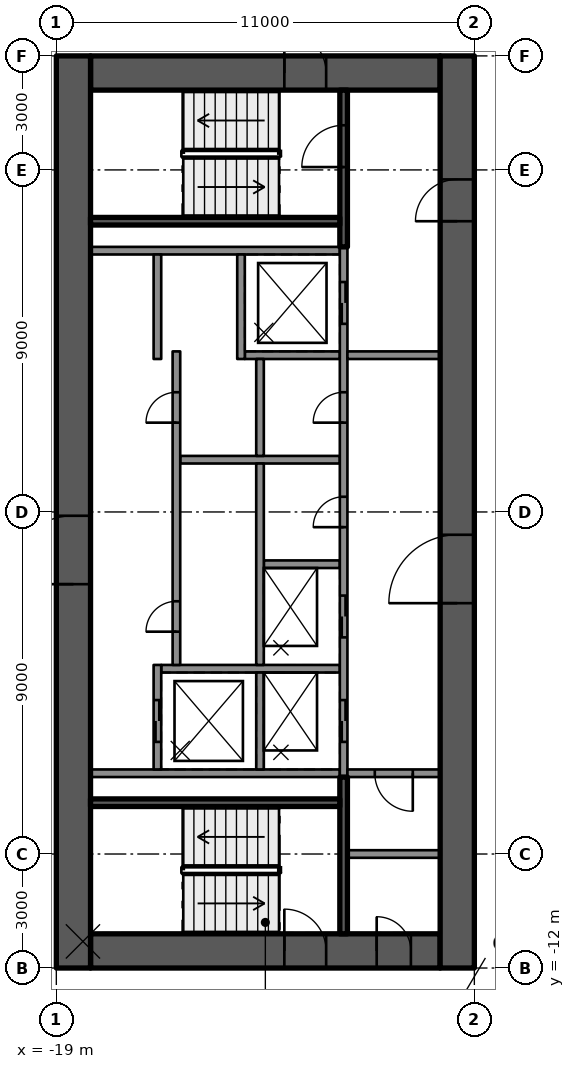
"""IFC4 building model, lengths in metres.
Left out: names, types, materials, properties, quantities, classifications, styles, units other than length and angle.
Written with IfcOpenShell. Run it as: python <this file> out.ifc"""

import sys

from ifc_helpers import new_model, si_unit, direction, frame, frame_2d, origin, place, context, subcontext, project, spatial, rectangle, extrude, element, fill, save


model = new_model("IFC4")
c1 = context("Model", 3, precision=1e-05, world=origin(), true_north=direction((0.0, 1.0)))
c2 = subcontext(c1, "Body", "Model", "MODEL_VIEW")
j1 = project(units=[si_unit("LENGTHUNIT", "METRE"), si_unit("PLANEANGLEUNIT", "RADIAN")], contexts=[c1])
p1 = place(None, origin())
s1 = spatial("IfcSite", under=j1, at=p1, CompositionType="ELEMENT")
p2 = place(p1, origin())
s2 = spatial("IfcBuilding", under=s1, at=p2, CompositionType="ELEMENT")
p3 = place(p2, frame((0.0, 0.0, 296.4)))
s3 = spatial("IfcBuildingStorey", under=s2, at=p3, CompositionType="ELEMENT", Elevation=296.4)
p4 = place(p3, frame((-18.1, 11.55, 0.0), z_axis=(0.0, 0.0, 1.0), x_axis=(1.0, 0.0, 0.0)))
e1 = element("IfcWall", 1, at=p4, inside=s3, PredefinedType="SHEAR", context=c2, shape_type="SweptSolid", body=[
    extrude(rectangle(XDim=9.2, YDim=0.9, at=frame_2d((4.6, 0.0))), origin(), (0.0, 0.0, 1.0), 3.5),
])
p5 = place(p4, frame((5.1, 0.0, 0.0)))
e2 = element("IfcOpeningElement", 2, at=p5, cuts=e1, PredefinedType="OPENING", context=c2, shape_type="SweptSolid", body=[
    extrude(rectangle(XDim=1.1, YDim=2.1, at=frame_2d((0.55, 1.05))), frame((0.0, 0.46, 0.0), z_axis=(0.0, -1.0, 0.0), x_axis=(1.0, 0.0, 0.0)), (0.0, 0.0, 1.0), 0.92),
])
p6 = place(p3, frame((-18.1, -11.55, 0.0), z_axis=(0.0, 0.0, 1.0), x_axis=(1.0, 0.0, 0.0)))
e3 = element("IfcWall", 3, at=p6, inside=s3, PredefinedType="SHEAR", context=c2, shape_type="SweptSolid", body=[
    extrude(rectangle(XDim=9.2, YDim=0.9, at=frame_2d((4.6, 0.0))), origin(), (0.0, 0.0, 1.0), 3.5),
])
p7 = place(p6, frame((5.1, 0.0, 0.0)))
e4 = element("IfcOpeningElement", 4, at=p7, cuts=e3, PredefinedType="OPENING", context=c2, shape_type="SweptSolid", body=[
    extrude(rectangle(XDim=1.1, YDim=2.1, at=frame_2d((0.55, 1.05))), frame((0.0, 0.46, 0.0), z_axis=(0.0, -1.0, 0.0), x_axis=(1.0, 0.0, 0.0)), (0.0, 0.0, 1.0), 0.92),
])
p8 = place(p6, frame((7.53, 0.0, 0.0)))
e5 = element("IfcOpeningElement", 5, at=p8, cuts=e3, PredefinedType="OPENING", context=c2, shape_type="SweptSolid", body=[
    extrude(rectangle(XDim=0.9, YDim=2.1, at=frame_2d((0.45, 1.05))), frame((0.0, 0.46, 0.0), z_axis=(0.0, -1.0, 0.0), x_axis=(1.0, 0.0, 0.0)), (0.0, 0.0, 1.0), 0.92),
])
p9 = place(p3, frame((-18.55, -12.0, 0.0), z_axis=(0.0, 0.0, 1.0), x_axis=(0.0, 1.0, 0.0)))
e6 = element("IfcWall", 6, at=p9, inside=s3, PredefinedType="SHEAR", context=c2, shape_type="SweptSolid", body=[
    extrude(rectangle(XDim=24.0, YDim=0.9, at=frame_2d((12.0, 0.0))), origin(), (0.0, 0.0, 1.0), 3.5),
])
p10 = place(p9, frame((10.1, 0.0, 0.0)))
e7 = element("IfcOpeningElement", 7, at=p10, cuts=e6, PredefinedType="OPENING", context=c2, shape_type="SweptSolid", body=[
    extrude(rectangle(XDim=1.8, YDim=2.1, at=frame_2d((0.9, 1.05))), frame((0.0, 0.46, 0.0), z_axis=(0.0, -1.0, 0.0), x_axis=(1.0, 0.0, 0.0)), (0.0, 0.0, 1.0), 0.92),
])
p11 = place(p3, frame((-8.45, -12.0, 0.0), z_axis=(0.0, 0.0, 1.0), x_axis=(0.0, 1.0, 0.0)))
e8 = element("IfcWall", 8, at=p11, inside=s3, PredefinedType="SHEAR", context=c2, shape_type="SweptSolid", body=[
    extrude(rectangle(XDim=24.0, YDim=0.9, at=frame_2d((12.0, 0.0))), origin(), (0.0, 0.0, 1.0), 3.5),
])
p12 = place(p11, frame((9.6, 0.0, 0.0)))
e9 = element("IfcOpeningElement", 9, at=p12, cuts=e8, PredefinedType="OPENING", context=c2, shape_type="SweptSolid", body=[
    extrude(rectangle(XDim=1.8, YDim=2.1, at=frame_2d((0.9, 1.05))), frame((0.0, 0.46, 0.0), z_axis=(0.0, -1.0, 0.0), x_axis=(1.0, 0.0, 0.0)), (0.0, 0.0, 1.0), 0.92),
])
p13 = place(p11, frame((19.65, 0.0, 0.0)))
e10 = element("IfcOpeningElement", 10, at=p13, cuts=e8, PredefinedType="OPENING", context=c2, shape_type="SweptSolid", body=[
    extrude(rectangle(XDim=1.1, YDim=2.1, at=frame_2d((0.55, 1.05))), frame((0.0, 0.46, 0.0), z_axis=(0.0, -1.0, 0.0), x_axis=(1.0, 0.0, 0.0)), (0.0, 0.0, 1.0), 0.92),
])
for number, where, z_axis, x_axis in (
    (11, (-11.54, 6.875, 0.0), (0.0, 0.0, 1.0), (-1.0, 0.0, 0.0)),
    (12, (-11.54, -6.875, 0.0), (0.0, 0.0, 1.0), (-1.0, 0.0, 0.0)),
):
    element("IfcWall", number, at=place(p3, frame(where, z_axis=z_axis, x_axis=x_axis)), inside=s3, PredefinedType="SOLIDWALL", context=c2, shape_type="SweptSolid", body=[
        extrude(rectangle(XDim=6.56, YDim=0.2, at=frame_2d((3.28, 0.0))), origin(), (0.0, 0.0, 1.0), 3.05),
    ])
p14 = place(p3, frame((-11.54, -4.125, 0.0), z_axis=(0.0, 0.0, 1.0), x_axis=(-1.0, 0.0, 0.0)))
e13 = element("IfcWall", 13, at=p14, inside=s3, PredefinedType="SOLIDWALL", context=c2, shape_type="SweptSolid", body=[
    extrude(rectangle(XDim=4.7, YDim=0.2, at=frame_2d((2.35, 0.0))), origin(), (0.0, 0.0, 1.0), 3.05),
])
p15 = place(p3, frame((-11.54, -1.375, 0.0), z_axis=(0.0, 0.0, 1.0), x_axis=(-1.0, 0.0, 0.0)))
e14 = element("IfcWall", 14, at=p15, inside=s3, PredefinedType="SOLIDWALL", context=c2, shape_type="SweptSolid", body=[
    extrude(rectangle(XDim=2.0, YDim=0.2, at=frame_2d((1.0, 0.0))), origin(), (0.0, 0.0, 1.0), 3.05),
])
p16 = place(p3, frame((-11.54, 1.375, 0.0), z_axis=(0.0, 0.0, 1.0), x_axis=(-1.0, 0.0, 0.0)))
e15 = element("IfcWall", 15, at=p16, inside=s3, PredefinedType="SOLIDWALL", context=c2, shape_type="SweptSolid", body=[
    extrude(rectangle(XDim=4.2, YDim=0.2, at=frame_2d((2.1, 0.0))), origin(), (0.0, 0.0, 1.0), 3.05),
])
p17 = place(p3, frame((-11.54, 4.125, 0.0), z_axis=(0.0, 0.0, 1.0), x_axis=(-1.0, 0.0, 0.0)))
e16 = element("IfcWall", 16, at=p17, inside=s3, PredefinedType="SOLIDWALL", context=c2, shape_type="SweptSolid", body=[
    extrude(rectangle(XDim=2.5, YDim=0.2, at=frame_2d((1.25, 0.0))), origin(), (0.0, 0.0, 1.0), 3.05),
])
p18 = place(p3, frame((-11.44, -6.975, 0.0), z_axis=(0.0, 0.0, 1.0), x_axis=(0.0, 1.0, 0.0)))
e17 = element("IfcWall", 17, at=p18, inside=s3, PredefinedType="SOLIDWALL", context=c2, shape_type="SweptSolid", body=[
    extrude(rectangle(XDim=13.95, YDim=0.2, at=frame_2d((6.975, 0.0))), origin(), (0.0, 0.0, 1.0), 3.05),
])
p19 = place(p18, frame((0.925, 0.0, 0.0)))
e18 = element("IfcOpeningElement", 18, at=p19, cuts=e17, PredefinedType="OPENING", context=c2, shape_type="SweptSolid", body=[
    extrude(rectangle(XDim=1.1, YDim=2.1, at=frame_2d((0.55, 1.05))), frame((0.0, 0.11, 0.0), z_axis=(0.0, -1.0, 0.0), x_axis=(1.0, 0.0, 0.0)), (0.0, 0.0, 1.0), 0.22),
])
p20 = place(p18, frame((3.675, 0.0, 0.0)))
e19 = element("IfcOpeningElement", 19, at=p20, cuts=e17, PredefinedType="OPENING", context=c2, shape_type="SweptSolid", body=[
    extrude(rectangle(XDim=1.1, YDim=2.1, at=frame_2d((0.55, 1.05))), frame((0.0, 0.11, 0.0), z_axis=(0.0, -1.0, 0.0), x_axis=(1.0, 0.0, 0.0)), (0.0, 0.0, 1.0), 0.22),
])
p21 = place(p18, frame((11.925, 0.0, 0.0)))
e20 = element("IfcOpeningElement", 20, at=p21, cuts=e17, PredefinedType="OPENING", context=c2, shape_type="SweptSolid", body=[
    extrude(rectangle(XDim=1.1, YDim=2.1, at=frame_2d((0.55, 1.05))), frame((0.0, 0.11, 0.0), z_axis=(0.0, -1.0, 0.0), x_axis=(1.0, 0.0, 0.0)), (0.0, 0.0, 1.0), 0.22),
])
p22 = place(p18, frame((6.575, 0.0, 0.0)))
e21 = element("IfcOpeningElement", 21, at=p22, cuts=e17, PredefinedType="OPENING", context=c2, shape_type="SweptSolid", body=[
    extrude(rectangle(XDim=0.8, YDim=2.1, at=frame_2d((0.4, 1.05))), frame((0.0, 0.11, 0.0), z_axis=(0.0, -1.0, 0.0), x_axis=(1.0, 0.0, 0.0)), (0.0, 0.0, 1.0), 0.22),
])
p23 = place(p18, frame((9.325, 0.0, 0.0)))
e22 = element("IfcOpeningElement", 22, at=p23, cuts=e17, PredefinedType="OPENING", context=c2, shape_type="SweptSolid", body=[
    extrude(rectangle(XDim=0.8, YDim=2.1, at=frame_2d((0.4, 1.05))), frame((0.0, 0.11, 0.0), z_axis=(0.0, -1.0, 0.0), x_axis=(1.0, 0.0, 0.0)), (0.0, 0.0, 1.0), 0.22),
])
p24 = place(p3, frame((-13.64, -6.775, 0.0), z_axis=(0.0, 0.0, 1.0), x_axis=(0.0, 1.0, 0.0)))
e23 = element("IfcWall", 23, at=p24, inside=s3, PredefinedType="SOLIDWALL", context=c2, shape_type="SweptSolid", body=[
    extrude(rectangle(XDim=2.55, YDim=0.2, at=frame_2d((1.275, 0.0))), origin(), (0.0, 0.0, 1.0), 3.05),
])
p25 = place(p3, frame((-13.64, -4.025, 0.0), z_axis=(0.0, 0.0, 1.0), x_axis=(0.0, 1.0, 0.0)))
e24 = element("IfcWall", 24, at=p25, inside=s3, PredefinedType="SOLIDWALL", context=c2, shape_type="SweptSolid", body=[
    extrude(rectangle(XDim=5.3, YDim=0.2, at=frame_2d((2.65, 0.0))), origin(), (0.0, 0.0, 1.0), 3.05),
])
p26 = place(p3, frame((-13.64, 1.475, 0.0), z_axis=(0.0, 0.0, 1.0), x_axis=(0.0, 1.0, 0.0)))
e25 = element("IfcWall", 25, at=p26, inside=s3, PredefinedType="SOLIDWALL", context=c2, shape_type="SweptSolid", body=[
    extrude(rectangle(XDim=2.55, YDim=0.2, at=frame_2d((1.275, 0.0))), origin(), (0.0, 0.0, 1.0), 3.05),
])
p27 = place(p3, frame((-14.14, 4.025, 0.0), z_axis=(0.0, 0.0, 1.0), x_axis=(0.0, 1.0, 0.0)))
e26 = element("IfcWall", 26, at=p27, inside=s3, PredefinedType="SOLIDWALL", context=c2, shape_type="SweptSolid", body=[
    extrude(rectangle(XDim=2.75, YDim=0.2, at=frame_2d((1.375, 0.0))), origin(), (0.0, 0.0, 1.0), 3.05),
])
p28 = place(p3, frame((-16.34, -6.775, 0.0), z_axis=(0.0, 0.0, 1.0), x_axis=(0.0, 1.0, 0.0)))
e27 = element("IfcWall", 27, at=p28, inside=s3, PredefinedType="SOLIDWALL", context=c2, shape_type="SweptSolid", body=[
    extrude(rectangle(XDim=2.75, YDim=0.2, at=frame_2d((1.375, 0.0))), origin(), (0.0, 0.0, 1.0), 3.05),
])
p29 = place(p28, frame((0.725, 0.0, 0.0)))
e28 = element("IfcOpeningElement", 28, at=p29, cuts=e27, PredefinedType="OPENING", context=c2, shape_type="SweptSolid", body=[
    extrude(rectangle(XDim=1.1, YDim=2.1, at=frame_2d((0.55, 1.05))), frame((0.0, 0.11, 0.0), z_axis=(0.0, -1.0, 0.0), x_axis=(1.0, 0.0, 0.0)), (0.0, 0.0, 1.0), 0.22),
])
p30 = place(p3, frame((-15.84, -4.025, 0.0), z_axis=(0.0, 0.0, 1.0), x_axis=(0.0, 1.0, 0.0)))
e29 = element("IfcWall", 29, at=p30, inside=s3, PredefinedType="SOLIDWALL", context=c2, shape_type="SweptSolid", body=[
    extrude(rectangle(XDim=8.25, YDim=0.2, at=frame_2d((4.125, 0.0))), origin(), (0.0, 0.0, 1.0), 3.05),
])
p31 = place(p30, frame((0.875, 0.0, 0.0)))
e30 = element("IfcOpeningElement", 30, at=p31, cuts=e29, PredefinedType="OPENING", context=c2, shape_type="SweptSolid", body=[
    extrude(rectangle(XDim=0.8, YDim=2.1, at=frame_2d((0.4, 1.05))), frame((0.0, 0.11, 0.0), z_axis=(0.0, -1.0, 0.0), x_axis=(1.0, 0.0, 0.0)), (0.0, 0.0, 1.0), 0.22),
])
p32 = place(p30, frame((6.375, 0.0, 0.0)))
e31 = element("IfcOpeningElement", 31, at=p32, cuts=e29, PredefinedType="OPENING", context=c2, shape_type="SweptSolid", body=[
    extrude(rectangle(XDim=0.8, YDim=2.1, at=frame_2d((0.4, 1.05))), frame((0.0, 0.11, 0.0), z_axis=(0.0, -1.0, 0.0), x_axis=(1.0, 0.0, 0.0)), (0.0, 0.0, 1.0), 0.22),
])
p33 = place(p3, frame((-16.34, 4.025, 0.0), z_axis=(0.0, 0.0, 1.0), x_axis=(0.0, 1.0, 0.0)))
e32 = element("IfcWall", 32, at=p33, inside=s3, PredefinedType="SOLIDWALL", context=c2, shape_type="SweptSolid", body=[
    extrude(rectangle(XDim=2.75, YDim=0.2, at=frame_2d((1.375, 0.0))), origin(), (0.0, 0.0, 1.0), 3.05),
])
p34 = place(p3, frame((-11.44, 6.975, 0.0), z_axis=(0.0, 0.0, 1.0), x_axis=(0.0, 1.0, 0.0)))
e33 = element("IfcWall", 33, at=p34, inside=s3, PredefinedType="SOLIDWALL", context=c2, shape_type="SweptSolid", body=[
    extrude(rectangle(XDim=4.125, YDim=0.2, at=frame_2d((2.062, 0.0))), origin(), (0.0, 0.0, 1.0), 3.05),
])
p35 = place(p34, frame((2.1, 0.0, 0.0)))
e34 = element("IfcOpeningElement", 34, at=p35, cuts=e33, PredefinedType="OPENING", context=c2, shape_type="SweptSolid", body=[
    extrude(rectangle(XDim=1.1, YDim=2.1, at=frame_2d((0.55, 1.05))), frame((0.0, 0.11, 0.0), z_axis=(0.0, -1.0, 0.0), x_axis=(1.0, 0.0, 0.0)), (0.0, 0.0, 1.0), 0.22),
])
p36 = place(p3, frame((-11.54, 7.65, 0.0), z_axis=(0.0, 0.0, 1.0), x_axis=(-1.0, 0.0, 0.0)))
e35 = element("IfcWall", 35, at=p36, inside=s3, PredefinedType="SOLIDWALL", context=c2, shape_type="SweptSolid", body=[
    extrude(rectangle(XDim=6.56, YDim=0.2, at=frame_2d((3.28, 0.0))), origin(), (0.0, 0.0, 1.0), 3.05),
])
p37 = place(p3, frame((-11.44, -11.1, 0.0), z_axis=(0.0, 0.0, 1.0), x_axis=(0.0, 1.0, 0.0)))
e36 = element("IfcWall", 36, at=p37, inside=s3, PredefinedType="SOLIDWALL", context=c2, shape_type="SweptSolid", body=[
    extrude(rectangle(XDim=4.125, YDim=0.2, at=frame_2d((2.062, 0.0))), origin(), (0.0, 0.0, 1.0), 3.05),
])
p38 = place(p3, frame((-11.54, -7.65, 0.0), z_axis=(0.0, 0.0, 1.0), x_axis=(-1.0, 0.0, 0.0)))
e37 = element("IfcWall", 37, at=p38, inside=s3, PredefinedType="SOLIDWALL", context=c2, shape_type="SweptSolid", body=[
    extrude(rectangle(XDim=6.56, YDim=0.2, at=frame_2d((3.28, 0.0))), origin(), (0.0, 0.0, 1.0), 3.05),
])
p39 = place(p3, frame((-8.9, 4.125, 0.0), z_axis=(0.0, 0.0, 1.0), x_axis=(-1.0, 0.0, 0.0)))
e38 = element("IfcWall", 38, at=p39, inside=s3, PredefinedType="PARTITIONING", context=c2, shape_type="SweptSolid", body=[
    extrude(rectangle(XDim=2.44, YDim=0.2, at=frame_2d((1.22, 0.0))), origin(), (0.0, 0.0, 1.0), 3.05),
])
p40 = place(p3, frame((-8.9, -6.875, 0.0), z_axis=(0.0, 0.0, 1.0), x_axis=(-1.0, 0.0, 0.0)))
e39 = element("IfcWall", 39, at=p40, inside=s3, PredefinedType="PARTITIONING", context=c2, shape_type="SweptSolid", body=[
    extrude(rectangle(XDim=2.44, YDim=0.2, at=frame_2d((1.22, 0.0))), origin(), (0.0, 0.0, 1.0), 3.05),
])
p41 = place(p40, frame((0.72, 0.0, 0.0)))
e40 = element("IfcOpeningElement", 40, at=p41, cuts=e39, PredefinedType="OPENING", context=c2, shape_type="SweptSolid", body=[
    extrude(rectangle(XDim=1.0, YDim=2.1, at=frame_2d((0.5, 1.05))), frame((0.0, 0.11, 0.0), z_axis=(0.0, -1.0, 0.0), x_axis=(1.0, 0.0, 0.0)), (0.0, 0.0, 1.0), 0.22),
])
p42 = place(p3, frame((-8.9, -9.0, 0.0), z_axis=(0.0, 0.0, 1.0), x_axis=(-1.0, 0.0, 0.0)))
e41 = element("IfcWall", 41, at=p42, inside=s3, PredefinedType="PARTITIONING", context=c2, shape_type="SweptSolid", body=[
    extrude(rectangle(XDim=2.44, YDim=0.2, at=frame_2d((1.22, 0.0))), origin(), (0.0, 0.0, 1.0), 3.05),
])
p43 = place(p19, origin())
e42 = element("IfcDoor", 42, at=p43, inside=s3, OperationType="DOUBLE_DOOR_SLIDING", PredefinedType="DOOR", context=c2, shape_type="SweptSolid", body=[
    extrude(rectangle(XDim=1.1, YDim=2.1, at=frame_2d((0.55, 1.05))), frame((0.0, 0.025, 0.0), z_axis=(0.0, -1.0, 0.0), x_axis=(1.0, 0.0, 0.0)), (0.0, 0.0, 1.0), 0.05),
])
fill(e18, e42)
p44 = place(p29, origin())
e43 = element("IfcDoor", 43, at=p44, inside=s3, OperationType="DOUBLE_DOOR_SLIDING", PredefinedType="DOOR", context=c2, shape_type="SweptSolid", body=[
    extrude(rectangle(XDim=1.1, YDim=2.1, at=frame_2d((0.55, 1.05))), frame((0.0, 0.025, 0.0), z_axis=(0.0, -1.0, 0.0), x_axis=(1.0, 0.0, 0.0)), (0.0, 0.0, 1.0), 0.05),
])
fill(e28, e43)
p45 = place(p20, origin())
e44 = element("IfcDoor", 44, at=p45, inside=s3, OperationType="DOUBLE_DOOR_SLIDING", PredefinedType="DOOR", context=c2, shape_type="SweptSolid", body=[
    extrude(rectangle(XDim=1.1, YDim=2.1, at=frame_2d((0.55, 1.05))), frame((0.0, 0.025, 0.0), z_axis=(0.0, -1.0, 0.0), x_axis=(1.0, 0.0, 0.0)), (0.0, 0.0, 1.0), 0.05),
])
fill(e19, e44)
p46 = place(p21, origin())
e45 = element("IfcDoor", 45, at=p46, inside=s3, OperationType="DOUBLE_DOOR_SLIDING", PredefinedType="DOOR", context=c2, shape_type="SweptSolid", body=[
    extrude(rectangle(XDim=1.1, YDim=2.1, at=frame_2d((0.55, 1.05))), frame((0.0, 0.025, 0.0), z_axis=(0.0, -1.0, 0.0), x_axis=(1.0, 0.0, 0.0)), (0.0, 0.0, 1.0), 0.05),
])
fill(e20, e45)
p47 = place(p31, origin())
e46 = element("IfcDoor", 46, at=p47, inside=s3, OperationType="SINGLE_SWING_LEFT", PredefinedType="DOOR", context=c2, shape_type="SweptSolid", body=[
    extrude(rectangle(XDim=0.8, YDim=2.1, at=frame_2d((0.4, 1.05))), frame((0.0, 0.025, 0.0), z_axis=(0.0, -1.0, 0.0), x_axis=(1.0, 0.0, 0.0)), (0.0, 0.0, 1.0), 0.05),
])
fill(e30, e46)
p48 = place(p22, origin())
e47 = element("IfcDoor", 47, at=p48, inside=s3, OperationType="SINGLE_SWING_LEFT", PredefinedType="DOOR", context=c2, shape_type="SweptSolid", body=[
    extrude(rectangle(XDim=0.8, YDim=2.1, at=frame_2d((0.4, 1.05))), frame((0.0, 0.025, 0.0), z_axis=(0.0, -1.0, 0.0), x_axis=(1.0, 0.0, 0.0)), (0.0, 0.0, 1.0), 0.05),
])
fill(e21, e47)
p49 = place(p23, origin())
e48 = element("IfcDoor", 48, at=p49, inside=s3, OperationType="SINGLE_SWING_LEFT", PredefinedType="DOOR", context=c2, shape_type="SweptSolid", body=[
    extrude(rectangle(XDim=0.8, YDim=2.1, at=frame_2d((0.4, 1.05))), frame((0.0, 0.025, 0.0), z_axis=(0.0, -1.0, 0.0), x_axis=(1.0, 0.0, 0.0)), (0.0, 0.0, 1.0), 0.05),
])
fill(e22, e48)
p50 = place(p32, origin())
e49 = element("IfcDoor", 49, at=p50, inside=s3, OperationType="SINGLE_SWING_LEFT", PredefinedType="DOOR", context=c2, shape_type="SweptSolid", body=[
    extrude(rectangle(XDim=0.8, YDim=2.1, at=frame_2d((0.4, 1.05))), frame((0.0, 0.025, 0.0), z_axis=(0.0, -1.0, 0.0), x_axis=(1.0, 0.0, 0.0)), (0.0, 0.0, 1.0), 0.05),
])
fill(e31, e49)
p51 = place(p12, origin())
e50 = element("IfcDoor", 50, at=p51, inside=s3, OperationType="SINGLE_SWING_LEFT", PredefinedType="DOOR", context=c2, shape_type="SweptSolid", body=[
    extrude(rectangle(XDim=1.8, YDim=2.1, at=frame_2d((0.9, 1.05))), frame((0.0, 0.025, 0.0), z_axis=(0.0, -1.0, 0.0), x_axis=(1.0, 0.0, 0.0)), (0.0, 0.0, 1.0), 0.05),
])
fill(e9, e50)
p52 = place(p10, origin())
e51 = element("IfcDoor", 51, at=p52, inside=s3, OperationType="SINGLE_SWING_LEFT", PredefinedType="DOOR", context=c2, shape_type="SweptSolid", body=[
    extrude(rectangle(XDim=1.8, YDim=2.1, at=frame_2d((0.9, 1.05))), frame((0.0, 0.025, 0.0), z_axis=(0.0, -1.0, 0.0), x_axis=(1.0, 0.0, 0.0)), (0.0, 0.0, 1.0), 0.05),
])
fill(e7, e51)
p53 = place(p13, origin())
e52 = element("IfcDoor", 52, at=p53, inside=s3, OperationType="SINGLE_SWING_RIGHT", PredefinedType="DOOR", context=c2, shape_type="SweptSolid", body=[
    extrude(rectangle(XDim=1.1, YDim=2.1, at=frame_2d((0.55, 1.05))), frame((0.0, 0.025, 0.0), z_axis=(0.0, -1.0, 0.0), x_axis=(1.0, 0.0, 0.0)), (0.0, 0.0, 1.0), 0.05),
])
fill(e10, e52)
p54 = place(p5, origin())
e53 = element("IfcDoor", 53, at=p54, inside=s3, OperationType="SINGLE_SWING_RIGHT", PredefinedType="DOOR", context=c2, shape_type="SweptSolid", body=[
    extrude(rectangle(XDim=1.1, YDim=2.1, at=frame_2d((0.55, 1.05))), frame((0.0, 0.025, 0.0), z_axis=(0.0, -1.0, 0.0), x_axis=(1.0, 0.0, 0.0)), (0.0, 0.0, 1.0), 0.05),
])
fill(e2, e53)
p55 = place(p7, origin())
e54 = element("IfcDoor", 54, at=p55, inside=s3, OperationType="SINGLE_SWING_RIGHT", PredefinedType="DOOR", context=c2, shape_type="SweptSolid", body=[
    extrude(rectangle(XDim=1.1, YDim=2.1, at=frame_2d((0.55, 1.05))), frame((0.0, 0.025, 0.0), z_axis=(0.0, -1.0, 0.0), x_axis=(1.0, 0.0, 0.0)), (0.0, 0.0, 1.0), 0.05),
])
fill(e4, e54)
p56 = place(p35, origin())
e55 = element("IfcDoor", 55, at=p56, inside=s3, OperationType="SINGLE_SWING_RIGHT", PredefinedType="DOOR", context=c2, shape_type="SweptSolid", body=[
    extrude(rectangle(XDim=1.1, YDim=2.1, at=frame_2d((0.55, 1.05))), frame((0.0, 0.025, 0.0), z_axis=(0.0, -1.0, 0.0), x_axis=(1.0, 0.0, 0.0)), (0.0, 0.0, 1.0), 0.05),
])
fill(e34, e55)
p57 = place(p8, origin())
e56 = element("IfcDoor", 56, at=p57, inside=s3, OperationType="SINGLE_SWING_RIGHT", PredefinedType="DOOR", context=c2, shape_type="SweptSolid", body=[
    extrude(rectangle(XDim=0.9, YDim=2.1, at=frame_2d((0.45, 1.05))), frame((0.0, 0.025, 0.0), z_axis=(0.0, -1.0, 0.0), x_axis=(1.0, 0.0, 0.0)), (0.0, 0.0, 1.0), 0.05),
])
fill(e5, e56)
p58 = place(p41, origin())
e57 = element("IfcDoor", 57, at=p58, inside=s3, OperationType="SINGLE_SWING_RIGHT", PredefinedType="DOOR", context=c2, shape_type="SweptSolid", body=[
    extrude(rectangle(XDim=1.0, YDim=2.1, at=frame_2d((0.5, 1.05))), frame((0.0, 0.025, 0.0), z_axis=(0.0, -1.0, 0.0), x_axis=(1.0, 0.0, 0.0)), (0.0, 0.0, 1.0), 0.05),
])
fill(e40, e57)
save(model, sys.argv[1])
